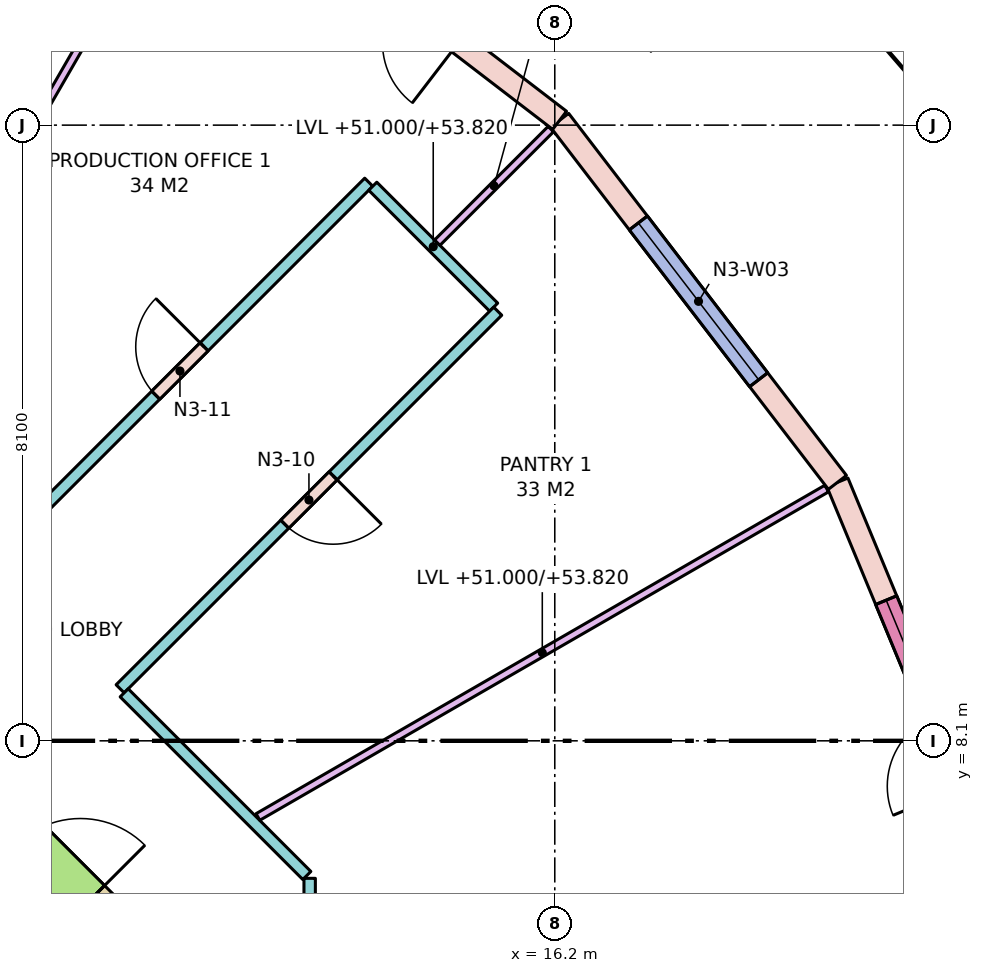
"""IFC4 building model, lengths in metres.
Left out: names, types, materials, properties, quantities, classifications, styles, units other than length and angle.
Written with IfcOpenShell. Run it as: python <this file> out.ifc"""

import sys

from ifc_helpers import new_model, si_unit, direction, frame, frame_2d, origin, place, context, subcontext, project, spatial, rectangle, extrude, element, fill, save


model = new_model("IFC4")
c1 = context("Model", 3, precision=1e-05, world=origin(), true_north=direction((0.0, 1.0)))
c2 = subcontext(c1, "Body", "Model", "MODEL_VIEW")
j1 = project(units=[si_unit("LENGTHUNIT", "METRE"), si_unit("PLANEANGLEUNIT", "RADIAN")], contexts=[c1])
p1 = place(None, origin())
s1 = spatial("IfcSite", under=j1, at=p1, CompositionType="ELEMENT")
p2 = place(p1, origin())
s2 = spatial("IfcBuilding", under=s1, at=p2, CompositionType="ELEMENT")
p3 = place(p2, frame((0.0, 0.0, 51.0)))
s3 = spatial("IfcBuildingStorey", under=s2, at=p3, CompositionType="ELEMENT", Elevation=51.0)
p4 = place(p3, frame((7.418, 8.418, -0.28), z_axis=(0.0, 0.0, 1.0), x_axis=(0.707106781187, -0.707106781187, 0.0)))
e1 = element("IfcWall", 1, at=p4, inside=s3, PredefinedType="SHEAR", context=c2, shape_type="SweptSolid", body=[
    extrude(rectangle(XDim=4.243, YDim=0.9, at=frame_2d((2.121, 0.0))), origin(), (0.0, 0.0, 1.0), 4.0),
])
p5 = place(p4, frame((2.393, 0.0, 0.28)))
e2 = element("IfcOpeningElement", 2, at=p5, cuts=e1, PredefinedType="OPENING", context=c2, shape_type="SweptSolid", body=[
    extrude(rectangle(XDim=1.2, YDim=2.1, at=frame_2d((0.6, 1.05))), frame((0.0, 0.46, 0.0), z_axis=(0.0, -1.0, 0.0), x_axis=(1.0, 0.0, 0.0)), (0.0, 0.0, 1.0), 0.92),
])
p6 = place(p3, frame((22.216, 5.953, 0.0), z_axis=(0.0, 0.0, 1.0), x_axis=(-0.382671411433, 0.923884511653, 0.0)))
e3 = element("IfcWall", 3, at=p6, inside=s3, PredefinedType="STANDARD", context=c2, shape_type="SweptSolid", body=[
    extrude(rectangle(XDim=6.004, YDim=0.3, at=frame_2d((3.002, 0.0))), origin(), (0.0, 0.0, 1.0), 3.72),
])
p7 = place(p6, frame((1.677, 0.0, 0.0)))
e4 = element("IfcOpeningElement", 4, at=p7, cuts=e3, PredefinedType="OPENING", context=c2, shape_type="SweptSolid", body=[
    extrude(rectangle(XDim=1.0, YDim=2.4, at=frame_2d((0.5, 1.2))), frame((0.0, 0.16, 0.0), z_axis=(0.0, -1.0, 0.0), x_axis=(1.0, 0.0, 0.0)), (0.0, 0.0, 1.0), 0.32),
])
p8 = place(p6, frame((2.827, 0.0, 0.8)))
e5 = element("IfcOpeningElement", 5, at=p8, cuts=e3, PredefinedType="OPENING", context=c2, shape_type="SweptSolid", body=[
    extrude(rectangle(XDim=1.5, YDim=2.7, at=frame_2d((0.75, 1.35))), frame((0.0, 0.16, 0.0), z_axis=(0.0, -1.0, 0.0), x_axis=(1.0, 0.0, 0.0)), (0.0, 0.0, 1.0), 0.32),
])
p9 = place(p3, frame((19.919, 11.5, 0.0), z_axis=(0.0, 0.0, 1.0), x_axis=(-0.608778912074, 0.793339924758, 0.0)))
e6 = element("IfcWall", 6, at=p9, inside=s3, PredefinedType="STANDARD", context=c2, shape_type="SweptSolid", body=[
    extrude(rectangle(XDim=6.004, YDim=0.3, at=frame_2d((3.002, 0.0))), origin(), (0.0, 0.0, 1.0), 3.72),
])
p10 = place(p9, frame((1.702, 0.0, 0.8)))
e7 = element("IfcOpeningElement", 7, at=p10, cuts=e6, PredefinedType="OPENING", context=c2, shape_type="SweptSolid", body=[
    extrude(rectangle(XDim=2.6, YDim=2.7, at=frame_2d((1.3, 1.35))), frame((0.0, 0.16, 0.0), z_axis=(0.0, -1.0, 0.0), x_axis=(1.0, 0.0, 0.0)), (0.0, 0.0, 1.0), 0.32),
])
p11 = place(p3, frame((16.263, 16.263, 0.0), z_axis=(0.0, 0.0, 1.0), x_axis=(-0.793339924758, 0.608778912074, 0.0)))
e8 = element("IfcWall", 8, at=p11, inside=s3, PredefinedType="STANDARD", context=c2, shape_type="SweptSolid", body=[
    extrude(rectangle(XDim=6.004, YDim=0.3, at=frame_2d((3.002, 0.0))), origin(), (0.0, 0.0, 1.0), 3.72),
])
p12 = place(p11, frame((1.677, 0.0, 0.0)))
e9 = element("IfcOpeningElement", 9, at=p12, cuts=e8, PredefinedType="OPENING", context=c2, shape_type="SweptSolid", body=[
    extrude(rectangle(XDim=1.0, YDim=2.4, at=frame_2d((0.5, 1.2))), frame((0.0, 0.16, 0.0), z_axis=(0.0, -1.0, 0.0), x_axis=(1.0, 0.0, 0.0)), (0.0, 0.0, 1.0), 0.32),
])
p13 = place(p11, frame((2.827, 0.0, 0.8)))
e10 = element("IfcOpeningElement", 10, at=p13, cuts=e8, PredefinedType="OPENING", context=c2, shape_type="SweptSolid", body=[
    extrude(rectangle(XDim=1.5, YDim=2.7, at=frame_2d((0.75, 1.35))), frame((0.0, 0.16, 0.0), z_axis=(0.0, -1.0, 0.0), x_axis=(1.0, 0.0, 0.0)), (0.0, 0.0, 1.0), 0.32),
])
p14 = place(p3, frame((8.784, 10.481, 0.0), z_axis=(0.0, 0.0, 1.0), x_axis=(0.707089406061, 0.707124155885, 0.0)))
e11 = element("IfcWall", 11, at=p14, inside=s3, PredefinedType="PARTITIONING", context=c2, shape_type="SweptSolid", body=[
    extrude(rectangle(XDim=7.026, YDim=0.15, at=frame_2d((3.513, 0.0))), origin(), (0.0, 0.0, 1.0), 3.72),
])
p15 = place(p14, frame((3.063, 0.0, 0.0)))
e12 = element("IfcOpeningElement", 12, at=p15, cuts=e11, PredefinedType="OPENING", context=c2, shape_type="SweptSolid", body=[
    extrude(rectangle(XDim=0.9, YDim=2.1, at=frame_2d((0.45, 1.05))), frame((0.0, 0.085, 0.0), z_axis=(0.0, -1.0, 0.0), x_axis=(1.0, 0.0, 0.0)), (0.0, 0.0, 1.0), 0.17),
])
p16 = place(p3, frame((13.805, 15.396, 0.0), z_axis=(0.0, 0.0, 1.0), x_axis=(0.707106781187, -0.707106781187, 0.0)))
e13 = element("IfcWall", 13, at=p16, inside=s3, PredefinedType="PARTITIONING", context=c2, shape_type="SweptSolid", body=[
    extrude(rectangle(XDim=2.25, YDim=0.15, at=frame_2d((1.125, 0.0))), origin(), (0.0, 0.0, 1.0), 2.82),
])
p17 = place(p3, frame((15.449, 13.752, 0.0), z_axis=(0.0, 0.0, 1.0), x_axis=(-0.707124155885, -0.707089406061, 0.0)))
e14 = element("IfcWall", 14, at=p17, inside=s3, PredefinedType="PARTITIONING", context=c2, shape_type="SweptSolid", body=[
    extrude(rectangle(XDim=7.026, YDim=0.15, at=frame_2d((3.513, 0.0))), origin(), (0.0, 0.0, 1.0), 3.72),
])
p18 = place(p17, frame((3.063, 0.0, 0.0)))
e15 = element("IfcOpeningElement", 15, at=p18, cuts=e14, PredefinedType="OPENING", context=c2, shape_type="SweptSolid", body=[
    extrude(rectangle(XDim=0.9, YDim=2.1, at=frame_2d((0.45, 1.05))), frame((0.0, 0.085, 0.0), z_axis=(0.0, -1.0, 0.0), x_axis=(1.0, 0.0, 0.0)), (0.0, 0.0, 1.0), 0.17),
])
p19 = place(p3, frame((10.534, 8.731, 0.0), z_axis=(0.0, 0.0, 1.0), x_axis=(0.707106781187, -0.707106781187, 0.0)))
e16 = element("IfcWall", 16, at=p19, inside=s3, PredefinedType="PARTITIONING", context=c2, shape_type="SweptSolid", body=[
    extrude(rectangle(XDim=3.399, YDim=0.15, at=frame_2d((1.7, 0.0))), origin(), (0.0, 0.0, 1.0), 2.82),
])
p20 = place(p3, frame((12.975, 6.291, 0.0), z_axis=(0.0, 0.0, 1.0), x_axis=(0.0, -1.0, 0.0)))
e17 = element("IfcWall", 17, at=p20, inside=s3, PredefinedType="PARTITIONING", context=c2, shape_type="SweptSolid", body=[
    extrude(rectangle(XDim=12.582, YDim=0.15, at=frame_2d((6.291, 0.0))), origin(), (0.0, 0.0, 1.0), 2.82),
])
p21 = place(p20, frame((5.391, 0.0, 0.0)))
e18 = element("IfcOpeningElement", 18, at=p21, cuts=e17, PredefinedType="OPENING", context=c2, shape_type="SweptSolid", body=[
    extrude(rectangle(XDim=1.8, YDim=2.1, at=frame_2d((0.9, 1.05))), frame((0.0, 0.085, 0.0), z_axis=(0.0, -1.0, 0.0), x_axis=(1.0, 0.0, 0.0)), (0.0, 0.0, 1.0), 0.17),
])
p22 = place(p3, frame((12.294, 7.098, 0.0), z_axis=(0.0, 0.0, 1.0), x_axis=(0.866010547425, 0.500025731086, 0.0)))
e19 = element("IfcWall", 19, at=p22, inside=s3, PredefinedType="PARTITIONING", context=c2, shape_type="SweptSolid", body=[
    extrude(rectangle(XDim=8.641, YDim=0.1, at=frame_2d((4.32, 0.0))), origin(), (0.0, 0.0, 1.0), 2.82),
])
p23 = place(p3, frame((14.654, 14.654, 0.0), z_axis=(0.0, 0.0, 1.0), x_axis=(0.707106781187, 0.707106781187, 0.0)))
e20 = element("IfcWall", 20, at=p23, inside=s3, PredefinedType="PARTITIONING", context=c2, shape_type="SweptSolid", body=[
    extrude(rectangle(XDim=2.113, YDim=0.1, at=frame_2d((1.057, 0.0))), origin(), (0.0, 0.0, 1.0), 2.82),
])
p24 = place(p3, frame((6.394, 11.075, 0.0), z_axis=(0.0, 0.0, 1.0), x_axis=(0.500024592647, 0.866011204747, 0.0)))
e21 = element("IfcWall", 21, at=p24, inside=s3, PredefinedType="PARTITIONING", context=c2, shape_type="SweptSolid", body=[
    extrude(rectangle(XDim=10.049, YDim=0.1, at=frame_2d((5.024, 0.0))), origin(), (0.0, 0.0, 1.0), 2.82),
])
p25 = place(p8, origin())
e22 = element("IfcWindow", 22, at=p25, inside=s3, PartitioningType="SINGLE_PANEL", PredefinedType="WINDOW", context=c2, shape_type="SweptSolid", body=[
    extrude(rectangle(XDim=1.5, YDim=2.7, at=frame_2d((0.75, 1.35))), frame((0.0, 0.03, 0.0), z_axis=(0.0, -1.0, 0.0), x_axis=(1.0, 0.0, 0.0)), (0.0, 0.0, 1.0), 0.06),
])
fill(e5, e22)
p26 = place(p10, origin())
e23 = element("IfcWindow", 23, at=p26, inside=s3, PartitioningType="SINGLE_PANEL", PredefinedType="WINDOW", context=c2, shape_type="SweptSolid", body=[
    extrude(rectangle(XDim=2.6, YDim=2.7, at=frame_2d((1.3, 1.35))), frame((0.0, 0.03, 0.0), z_axis=(0.0, -1.0, 0.0), x_axis=(1.0, 0.0, 0.0)), (0.0, 0.0, 1.0), 0.06),
])
fill(e7, e23)
p27 = place(p5, origin())
e24 = element("IfcDoor", 24, at=p27, inside=s3, OperationType="SINGLE_SWING_RIGHT", PredefinedType="DOOR", context=c2, shape_type="SweptSolid", body=[
    extrude(rectangle(XDim=1.2, YDim=2.1, at=frame_2d((0.6, 1.05))), frame((0.0, 0.025, 0.0), z_axis=(0.0, -1.0, 0.0), x_axis=(1.0, 0.0, 0.0)), (0.0, 0.0, 1.0), 0.05),
])
fill(e2, e24)
p28 = place(p18, origin())
e25 = element("IfcDoor", 25, at=p28, inside=s3, OperationType="SINGLE_SWING_LEFT", PredefinedType="DOOR", context=c2, shape_type="SweptSolid", body=[
    extrude(rectangle(XDim=0.9, YDim=2.1, at=frame_2d((0.45, 1.05))), frame((0.0, 0.025, 0.0), z_axis=(0.0, -1.0, 0.0), x_axis=(1.0, 0.0, 0.0)), (0.0, 0.0, 1.0), 0.05),
])
fill(e15, e25)
p29 = place(p15, origin())
e26 = element("IfcDoor", 26, at=p29, inside=s3, OperationType="SINGLE_SWING_RIGHT", PredefinedType="DOOR", context=c2, shape_type="SweptSolid", body=[
    extrude(rectangle(XDim=0.9, YDim=2.1, at=frame_2d((0.45, 1.05))), frame((0.0, 0.025, 0.0), z_axis=(0.0, -1.0, 0.0), x_axis=(1.0, 0.0, 0.0)), (0.0, 0.0, 1.0), 0.05),
])
fill(e12, e26)
save(model, sys.argv[1])
